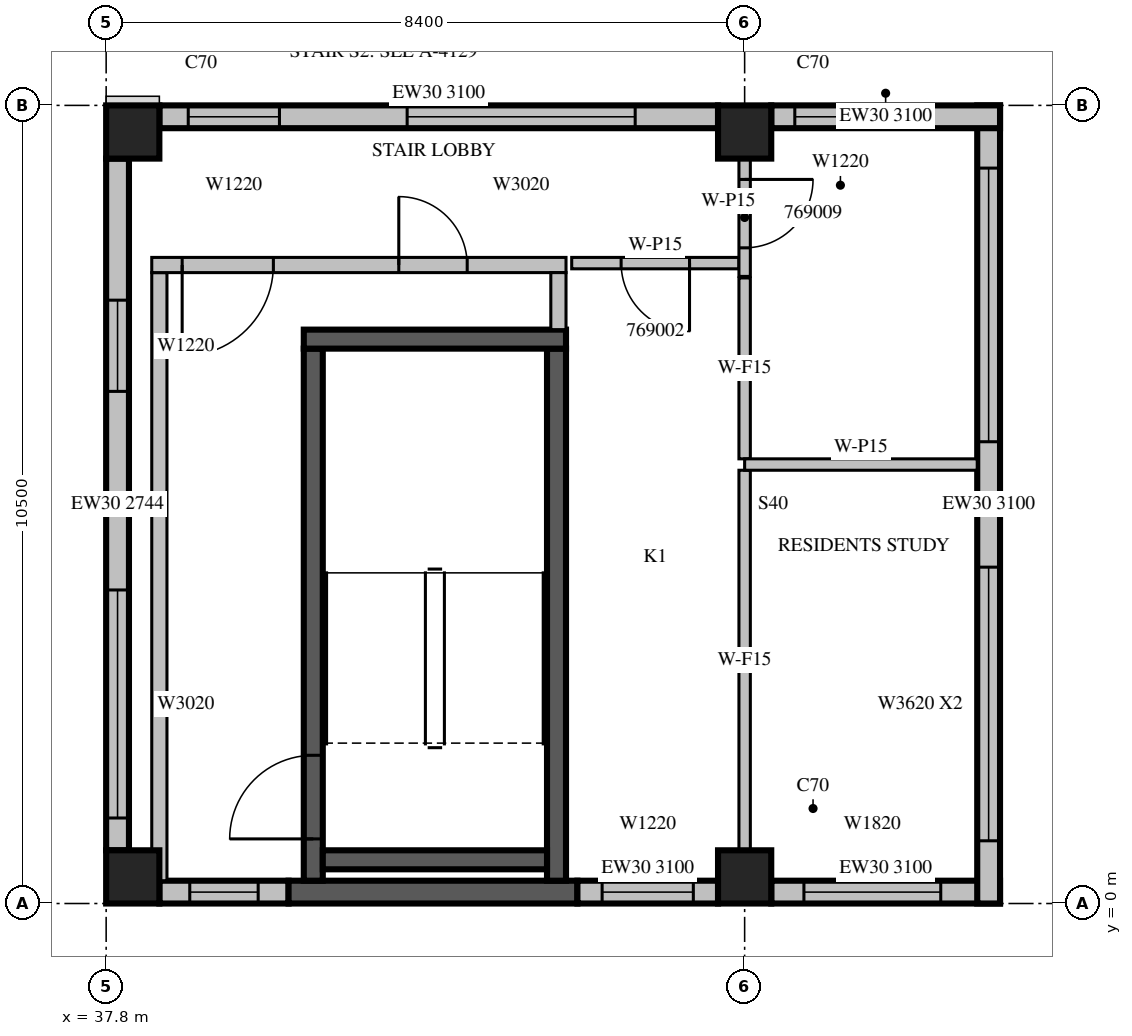
"""IFC4 building model, lengths in metres.
Left out: names, types, materials, properties, quantities, classifications, styles, units other than length and angle.
Written with IfcOpenShell. Run it as: python <this file> out.ifc"""

import sys

from ifc_helpers import new_model, si_unit, direction, frame, frame_2d, origin, origin_2d, place, context, subcontext, project, spatial, rectangle, extrude, source, transform, mapped, element, fill, save


model = new_model("IFC4")
c1 = context("Model", 3, precision=1e-05, world=origin(), true_north=direction((0.0, 1.0)))
c2 = subcontext(c1, "Body", "Model", "MODEL_VIEW")
j1 = project(units=[si_unit("LENGTHUNIT", "METRE"), si_unit("PLANEANGLEUNIT", "RADIAN")], contexts=[c1])
p1 = place(None, origin())
s1 = spatial("IfcSite", under=j1, at=p1, CompositionType="ELEMENT")
p2 = place(p1, origin())
s2 = spatial("IfcBuilding", under=s1, at=p2, CompositionType="ELEMENT")
p3 = place(p2, frame((0.0, 0.0, 302.0)))
s3 = spatial("IfcBuildingStorey", under=s2, at=p3, CompositionType="ELEMENT", Elevation=302.0)
m1 = source(origin(), c2, "Body", "SweptSolid", [
    extrude(rectangle(XDim=0.7, YDim=0.7, at=origin_2d()), origin(), (0.0, 0.0, 1.0), 3.5),
])
for number, where, z_axis, x_axis in (
    (1, (38.15, 0.35, 0.0), (0.0, 0.0, 1.0), (1.0, 0.0, 0.0)),
    (2, (46.2, 0.35, 0.0), (0.0, 0.0, 1.0), (1.0, 0.0, 0.0)),
    (3, (38.15, 10.15, 0.0), (0.0, 0.0, 1.0), (1.0, 0.0, 0.0)),
    (4, (46.2, 10.15, 0.0), (0.0, 0.0, 1.0), (1.0, 0.0, 0.0)),
):
    element("IfcColumn", number, at=place(p3, frame(where, z_axis=z_axis, x_axis=x_axis)), inside=s3, PredefinedType="COLUMN", context=c2, shape_type="MappedRepresentation", body=[
        mapped(m1, transform((0.0, 0.0, 0.0), scale=1.0)),
    ])
m2 = source(origin(), c2, "Body", "SweptSolid", [
    extrude(rectangle(XDim=1.7, YDim=0.3, at=frame_2d((0.85, 0.0))), origin(), (0.0, 0.0, 1.0), 3.1),
])
p4 = place(p3, frame((38.5, 0.15, 0.0), z_axis=(0.0, 0.0, 1.0), x_axis=(1.0, 0.0, 0.0)))
e5 = element("IfcWall", 5, at=p4, inside=s3, PredefinedType="STANDARD", context=c2, shape_type="MappedRepresentation", body=[
    mapped(m2, transform((0.0, 0.0, 0.0), scale=1.0)),
])
m3 = source(origin(), c2, "Body", "SweptSolid", [
    extrude(rectangle(XDim=0.9, YDim=2.0, at=frame_2d((0.45, 1.0))), frame((0.0, 0.16, 0.0), z_axis=(0.0, -1.0, 0.0), x_axis=(1.0, 0.0, 0.0)), (0.0, 0.0, 1.0), 0.32),
])
p5 = place(p4, frame((0.4, 0.0, 0.6)))
e6 = element("IfcOpeningElement", 6, at=p5, cuts=e5, PredefinedType="OPENING", context=c2, shape_type="MappedRepresentation", body=[
    mapped(m3, transform((0.0, 0.0, 0.0), scale=1.0)),
])
m4 = source(origin(), c2, "Body", "SweptSolid", [
    extrude(rectangle(XDim=3.8, YDim=0.3, at=frame_2d((1.9, 0.0))), origin(), (0.0, 0.0, 1.0), 3.1),
])
p6 = place(p3, frame((40.2, 0.15, 0.0), z_axis=(0.0, 0.0, 1.0), x_axis=(1.0, 0.0, 0.0)))
e7 = element("IfcWall", 7, at=p6, inside=s3, PredefinedType="SOLIDWALL", context=c2, shape_type="MappedRepresentation", body=[
    mapped(m4, transform((0.0, 0.0, 0.0), scale=1.0)),
])
m5 = source(origin(), c2, "Body", "SweptSolid", [
    extrude(rectangle(XDim=1.85, YDim=0.3, at=frame_2d((0.925, 0.0))), origin(), (0.0, 0.0, 1.0), 3.1),
])
p7 = place(p3, frame((44.0, 0.15, 0.0), z_axis=(0.0, 0.0, 1.0), x_axis=(1.0, 0.0, 0.0)))
e8 = element("IfcWall", 8, at=p7, inside=s3, PredefinedType="STANDARD", context=c2, shape_type="MappedRepresentation", body=[
    mapped(m5, transform((0.0, 0.0, 0.0), scale=1.0)),
])
m6 = source(origin(), c2, "Body", "SweptSolid", [
    extrude(rectangle(XDim=1.2, YDim=2.0, at=frame_2d((0.6, 1.0))), frame((0.0, 0.16, 0.0), z_axis=(0.0, -1.0, 0.0), x_axis=(1.0, 0.0, 0.0)), (0.0, 0.0, 1.0), 0.32),
])
p8 = place(p7, frame((0.325, 0.0, 0.6)))
e9 = element("IfcOpeningElement", 9, at=p8, cuts=e8, PredefinedType="OPENING", context=c2, shape_type="MappedRepresentation", body=[
    mapped(m6, transform((0.0, 0.0, 0.0), scale=1.0)),
])
m7 = source(origin(), c2, "Body", "SweptSolid", [
    extrude(rectangle(XDim=3.01, YDim=0.3, at=frame_2d((1.505, 0.0))), origin(), (0.0, 0.0, 1.0), 3.1),
])
p9 = place(p3, frame((46.55, 0.15, 0.0), z_axis=(0.0, 0.0, 1.0), x_axis=(1.0, 0.0, 0.0)))
e10 = element("IfcWall", 10, at=p9, inside=s3, PredefinedType="STANDARD", context=c2, shape_type="MappedRepresentation", body=[
    mapped(m7, transform((0.0, 0.0, 0.0), scale=1.0)),
])
m8 = source(origin(), c2, "Body", "SweptSolid", [
    extrude(rectangle(XDim=1.8, YDim=2.0, at=frame_2d((0.9, 1.0))), frame((0.0, 0.16, 0.0), z_axis=(0.0, -1.0, 0.0), x_axis=(1.0, 0.0, 0.0)), (0.0, 0.0, 1.0), 0.32),
])
p10 = place(p9, frame((0.43, 0.0, 0.6)))
e11 = element("IfcOpeningElement", 11, at=p10, cuts=e10, PredefinedType="OPENING", context=c2, shape_type="MappedRepresentation", body=[
    mapped(m8, transform((0.0, 0.0, 0.0), scale=1.0)),
])
m9 = source(origin(), c2, "Body", "SweptSolid", [
    extrude(rectangle(XDim=10.5, YDim=0.3, at=frame_2d((5.25, 0.0))), origin(), (0.0, 0.0, 1.0), 3.1),
])
p11 = place(p3, frame((49.41, 0.0, 0.0), z_axis=(0.0, 0.0, 1.0), x_axis=(0.0, 1.0, 0.0)))
e12 = element("IfcWall", 12, at=p11, inside=s3, PredefinedType="STANDARD", context=c2, shape_type="MappedRepresentation", body=[
    mapped(m9, transform((0.0, 0.0, 0.0), scale=1.0)),
])
m10 = source(origin(), c2, "Body", "SweptSolid", [
    extrude(rectangle(XDim=3.6, YDim=2.0, at=frame_2d((1.8, 1.0))), frame((0.0, 0.16, 0.0), z_axis=(0.0, -1.0, 0.0), x_axis=(1.0, 0.0, 0.0)), (0.0, 0.0, 1.0), 0.32),
])
p12 = place(p11, frame((0.825, 0.0, 0.6)))
e13 = element("IfcOpeningElement", 13, at=p12, cuts=e12, PredefinedType="OPENING", context=c2, shape_type="MappedRepresentation", body=[
    mapped(m10, transform((0.0, 0.0, 0.0), scale=1.0)),
])
p13 = place(p11, frame((6.075, 0.0, 0.6)))
e14 = element("IfcOpeningElement", 14, at=p13, cuts=e12, PredefinedType="OPENING", context=c2, shape_type="MappedRepresentation", body=[
    mapped(m10, transform((0.0, 0.0, 0.0), scale=1.0)),
])
p14 = place(p3, frame((49.56, 10.35, 0.0), z_axis=(0.0, 0.0, 1.0), x_axis=(-1.0, 0.0, 0.0)))
e15 = element("IfcWall", 15, at=p14, inside=s3, PredefinedType="STANDARD", context=c2, shape_type="MappedRepresentation", body=[
    mapped(m7, transform((0.0, 0.0, 0.0), scale=1.0)),
])
p15 = place(p14, frame((1.5, 0.0, 0.6)))
e16 = element("IfcOpeningElement", 16, at=p15, cuts=e15, PredefinedType="OPENING", context=c2, shape_type="MappedRepresentation", body=[
    mapped(m6, transform((0.0, 0.0, 0.0), scale=1.0)),
])
m11 = source(origin(), c2, "Body", "SweptSolid", [
    extrude(rectangle(XDim=7.35, YDim=0.3, at=frame_2d((3.675, 0.0))), origin(), (0.0, 0.0, 1.0), 3.1),
])
p16 = place(p3, frame((45.85, 10.35, 0.0), z_axis=(0.0, 0.0, 1.0), x_axis=(-1.0, 0.0, 0.0)))
e17 = element("IfcWall", 17, at=p16, inside=s3, PredefinedType="STANDARD", context=c2, shape_type="MappedRepresentation", body=[
    mapped(m11, transform((0.0, 0.0, 0.0), scale=1.0)),
])
m12 = source(origin(), c2, "Body", "SweptSolid", [
    extrude(rectangle(XDim=3.0, YDim=2.0, at=frame_2d((1.5, 1.0))), frame((0.0, 0.16, 0.0), z_axis=(0.0, -1.0, 0.0), x_axis=(1.0, 0.0, 0.0)), (0.0, 0.0, 1.0), 0.32),
])
p17 = place(p16, frame((1.09, 0.0, 0.6)))
e18 = element("IfcOpeningElement", 18, at=p17, cuts=e17, PredefinedType="OPENING", context=c2, shape_type="MappedRepresentation", body=[
    mapped(m12, transform((0.0, 0.0, 0.0), scale=1.0)),
])
p18 = place(p16, frame((5.77, 0.0, 0.6)))
e19 = element("IfcOpeningElement", 19, at=p18, cuts=e17, PredefinedType="OPENING", context=c2, shape_type="MappedRepresentation", body=[
    mapped(m6, transform((0.0, 0.0, 0.0), scale=1.0)),
])
m13 = source(origin(), c2, "Body", "SweptSolid", [
    extrude(rectangle(XDim=9.1, YDim=0.3, at=frame_2d((4.55, 0.0))), origin(), (0.0, 0.0, 1.0), 2.744),
])
p19 = place(p3, frame((37.95, 9.8, 0.0), z_axis=(0.0, 0.0, 1.0), x_axis=(0.0, -1.0, 0.0)))
e20 = element("IfcWall", 20, at=p19, inside=s3, PredefinedType="STANDARD", context=c2, shape_type="MappedRepresentation", body=[
    mapped(m13, transform((0.0, 0.0, 0.0), scale=1.0)),
])
p20 = place(p19, frame((1.863, 0.0, 0.6)))
e21 = element("IfcOpeningElement", 21, at=p20, cuts=e20, PredefinedType="OPENING", context=c2, shape_type="MappedRepresentation", body=[
    mapped(m6, transform((0.0, 0.0, 0.0), scale=1.0)),
])
p21 = place(p19, frame((5.675, 0.0, 0.6)))
e22 = element("IfcOpeningElement", 22, at=p21, cuts=e20, PredefinedType="OPENING", context=c2, shape_type="MappedRepresentation", body=[
    mapped(m12, transform((0.0, 0.0, 0.0), scale=1.0)),
])
m14 = source(origin(), c2, "Body", "SweptSolid", [
    extrude(rectangle(XDim=7.0, YDim=0.25, at=frame_2d((3.5, 0.0))), origin(), (0.0, 0.0, 1.0), 3.1),
])
p22 = place(p3, frame((40.525, 0.3, 0.0), z_axis=(0.0, 0.0, 1.0), x_axis=(0.0, 1.0, 0.0)))
e23 = element("IfcWall", 23, at=p22, inside=s3, PredefinedType="SOLIDWALL", context=c2, shape_type="MappedRepresentation", body=[
    mapped(m14, transform((0.0, 0.0, 0.0), scale=1.0)),
])
m15 = source(origin(), c2, "Body", "SweptSolid", [
    extrude(rectangle(XDim=1.1, YDim=2.1, at=frame_2d((0.55, 1.05))), frame((0.0, 0.135, 0.0), z_axis=(0.0, -1.0, 0.0), x_axis=(1.0, 0.0, 0.0)), (0.0, 0.0, 1.0), 0.27),
])
p23 = place(p22, frame((0.55, 0.0, 0.0)))
e24 = element("IfcOpeningElement", 24, at=p23, cuts=e23, PredefinedType="OPENING", context=c2, shape_type="MappedRepresentation", body=[
    mapped(m15, transform((0.0, 0.0, 0.0), scale=1.0)),
])
p24 = place(p3, frame((43.725, 0.3, 0.0), z_axis=(0.0, 0.0, 1.0), x_axis=(0.0, 1.0, 0.0)))
e25 = element("IfcWall", 25, at=p24, inside=s3, PredefinedType="SOLIDWALL", context=c2, shape_type="MappedRepresentation", body=[
    mapped(m14, transform((0.0, 0.0, 0.0), scale=1.0)),
])
m16 = source(origin(), c2, "Body", "SweptSolid", [
    extrude(rectangle(XDim=3.45, YDim=0.25, at=frame_2d((1.725, 0.0))), origin(), (0.0, 0.0, 1.0), 3.1),
])
p25 = place(p3, frame((40.4, 7.425, 0.0), z_axis=(0.0, 0.0, 1.0), x_axis=(1.0, 0.0, 0.0)))
e26 = element("IfcWall", 26, at=p25, inside=s3, PredefinedType="SOLIDWALL", context=c2, shape_type="MappedRepresentation", body=[
    mapped(m16, transform((0.0, 0.0, 0.0), scale=1.0)),
])
m17 = source(origin(), c2, "Body", "SweptSolid", [
    extrude(rectangle(XDim=2.95, YDim=0.25, at=frame_2d((1.475, 0.0))), origin(), (0.0, 0.0, 1.0), 3.1),
])
p26 = place(p3, frame((40.65, 0.575, 0.0), z_axis=(0.0, 0.0, 1.0), x_axis=(1.0, 0.0, 0.0)))
e27 = element("IfcWall", 27, at=p26, inside=s3, PredefinedType="SOLIDWALL", context=c2, shape_type="MappedRepresentation", body=[
    mapped(m17, transform((0.0, 0.0, 0.0), scale=1.0)),
])
m18 = source(origin(), c2, "Body", "SweptSolid", [
    extrude(rectangle(XDim=8.0, YDim=0.2, at=frame_2d((4.0, 0.0))), origin(), (0.0, 0.0, 1.0), 3.1),
])
p27 = place(p3, frame((38.5, 0.3, 0.0), z_axis=(0.0, 0.0, 1.0), x_axis=(0.0, 1.0, 0.0)))
e28 = element("IfcWall", 28, at=p27, inside=s3, PredefinedType="PARTITIONING", context=c2, shape_type="MappedRepresentation", body=[
    mapped(m18, transform((0.0, 0.0, 0.0), scale=1.0)),
])
m19 = source(origin(), c2, "Body", "SweptSolid", [
    extrude(rectangle(XDim=5.45, YDim=0.2, at=frame_2d((2.725, 0.0))), origin(), (0.0, 0.0, 1.0), 3.1),
])
p28 = place(p3, frame((38.4, 8.4, 0.0), z_axis=(0.0, 0.0, 1.0), x_axis=(1.0, 0.0, 0.0)))
e29 = element("IfcWall", 29, at=p28, inside=s3, PredefinedType="PARTITIONING", context=c2, shape_type="MappedRepresentation", body=[
    mapped(m19, transform((0.0, 0.0, 0.0), scale=1.0)),
])
m20 = source(origin(), c2, "Body", "SweptSolid", [
    extrude(rectangle(XDim=1.2, YDim=2.1, at=frame_2d((0.6, 1.05))), frame((0.0, 0.11, 0.0), z_axis=(0.0, -1.0, 0.0), x_axis=(1.0, 0.0, 0.0)), (0.0, 0.0, 1.0), 0.22),
])
p29 = place(p28, frame((0.4, 0.0, 0.0)))
e30 = element("IfcOpeningElement", 30, at=p29, cuts=e29, PredefinedType="OPENING", context=c2, shape_type="MappedRepresentation", body=[
    mapped(m20, transform((0.0, 0.0, 0.0), scale=1.0)),
])
m21 = source(origin(), c2, "Body", "SweptSolid", [
    extrude(rectangle(XDim=0.9, YDim=2.1, at=frame_2d((0.45, 1.05))), frame((0.0, 0.11, 0.0), z_axis=(0.0, -1.0, 0.0), x_axis=(1.0, 0.0, 0.0)), (0.0, 0.0, 1.0), 0.22),
])
p30 = place(p28, frame((3.25, 0.0, 0.0)))
e31 = element("IfcOpeningElement", 31, at=p30, cuts=e29, PredefinedType="OPENING", context=c2, shape_type="MappedRepresentation", body=[
    mapped(m21, transform((0.0, 0.0, 0.0), scale=1.0)),
])
m22 = source(origin(), c2, "Body", "SweptSolid", [
    extrude(rectangle(XDim=0.75, YDim=0.2, at=frame_2d((0.375, 0.0))), origin(), (0.0, 0.0, 1.0), 3.1),
])
p31 = place(p3, frame((43.75, 7.55, 0.0), z_axis=(0.0, 0.0, 1.0), x_axis=(0.0, 1.0, 0.0)))
e32 = element("IfcWall", 32, at=p31, inside=s3, PredefinedType="PARTITIONING", context=c2, shape_type="MappedRepresentation", body=[
    mapped(m22, transform((0.0, 0.0, 0.0), scale=1.0)),
])
m23 = source(origin(), c2, "Body", "SweptSolid", [
    extrude(rectangle(XDim=2.2, YDim=0.15, at=frame_2d((1.1, 0.0))), origin(), (0.0, 0.0, 1.0), 3.1),
])
p32 = place(p3, frame((46.125, 8.425, 0.0), z_axis=(0.0, 0.0, 1.0), x_axis=(-1.0, 0.0, 0.0)))
e33 = element("IfcWall", 33, at=p32, inside=s3, PredefinedType="PARTITIONING", context=c2, shape_type="MappedRepresentation", body=[
    mapped(m23, transform((0.0, 0.0, 0.0), scale=1.0)),
])
m24 = source(origin(), c2, "Body", "SweptSolid", [
    extrude(rectangle(XDim=0.9, YDim=2.1, at=frame_2d((0.45, 1.05))), frame((0.0, 0.085, 0.0), z_axis=(0.0, -1.0, 0.0), x_axis=(1.0, 0.0, 0.0)), (0.0, 0.0, 1.0), 0.17),
])
p33 = place(p32, frame((0.65, 0.0, 0.0)))
e34 = element("IfcOpeningElement", 34, at=p33, cuts=e33, PredefinedType="OPENING", context=c2, shape_type="MappedRepresentation", body=[
    mapped(m24, transform((0.0, 0.0, 0.0), scale=1.0)),
])
m25 = source(origin(), c2, "Body", "SweptSolid", [
    extrude(rectangle(XDim=1.551, YDim=0.15, at=frame_2d((0.775, 0.0))), origin(), (0.0, 0.0, 1.0), 3.1),
])
p34 = place(p3, frame((46.2, 9.801, 0.0), z_axis=(0.0, 0.0, 1.0), x_axis=(0.0, -1.0, 0.0)))
e35 = element("IfcWall", 35, at=p34, inside=s3, PredefinedType="PARTITIONING", context=c2, shape_type="MappedRepresentation", body=[
    mapped(m25, transform((0.0, 0.0, 0.0), scale=1.0)),
])
p35 = place(p34, frame((0.275, 0.0, 0.0)))
e36 = element("IfcOpeningElement", 36, at=p35, cuts=e35, PredefinedType="OPENING", context=c2, shape_type="MappedRepresentation", body=[
    mapped(m24, transform((0.0, 0.0, 0.0), scale=1.0)),
])
m26 = source(origin(), c2, "Body", "SweptSolid", [
    extrude(rectangle(XDim=5.001, YDim=0.15, at=frame_2d((2.501, 0.0))), origin(), (0.0, 0.0, 1.0), 3.1),
])
p36 = place(p3, frame((46.2, 0.699, 0.0), z_axis=(0.0, 0.0, 1.0), x_axis=(0.0, 1.0, 0.0)))
e37 = element("IfcWall", 37, at=p36, inside=s3, PredefinedType="PARTITIONING", context=c2, shape_type="MappedRepresentation", body=[
    mapped(m26, transform((0.0, 0.0, 0.0), scale=1.0)),
])
m27 = source(origin(), c2, "Body", "SweptSolid", [
    extrude(rectangle(XDim=2.38, YDim=0.15, at=frame_2d((1.19, 0.0))), origin(), (0.0, 0.0, 1.0), 3.1),
])
p37 = place(p3, frame((46.2, 5.85, 0.0), z_axis=(0.0, 0.0, 1.0), x_axis=(0.0, 1.0, 0.0)))
e38 = element("IfcWall", 38, at=p37, inside=s3, PredefinedType="PARTITIONING", context=c2, shape_type="MappedRepresentation", body=[
    mapped(m27, transform((0.0, 0.0, 0.0), scale=1.0)),
])
m28 = source(origin(), c2, "Body", "SweptSolid", [
    extrude(rectangle(XDim=3.06, YDim=0.15, at=frame_2d((1.53, 0.0))), origin(), (0.0, 0.0, 1.0), 3.1),
])
p38 = place(p3, frame((49.26, 5.775, 0.0), z_axis=(0.0, 0.0, 1.0), x_axis=(-1.0, 0.0, 0.0)))
e39 = element("IfcWall", 39, at=p38, inside=s3, PredefinedType="PARTITIONING", context=c2, shape_type="MappedRepresentation", body=[
    mapped(m28, transform((0.0, 0.0, 0.0), scale=1.0)),
])
m29 = source(origin(), c2, "Body", "SweptSolid", [
    extrude(rectangle(XDim=0.9, YDim=2.0, at=frame_2d((0.45, 1.0))), frame((0.0, 0.03, 0.0), z_axis=(0.0, -1.0, 0.0), x_axis=(1.0, 0.0, 0.0)), (0.0, 0.0, 1.0), 0.06),
])
p39 = place(p5, origin())
e40 = element("IfcWindow", 40, at=p39, inside=s3, PartitioningType="SINGLE_PANEL", PredefinedType="WINDOW", context=c2, shape_type="MappedRepresentation", body=[
    mapped(m29, transform((0.0, 0.0, 0.0), scale=1.0)),
])
fill(e6, e40)
m30 = source(origin(), c2, "Body", "SweptSolid", [
    extrude(rectangle(XDim=1.2, YDim=2.0, at=frame_2d((0.6, 1.0))), frame((0.0, 0.03, 0.0), z_axis=(0.0, -1.0, 0.0), x_axis=(1.0, 0.0, 0.0)), (0.0, 0.0, 1.0), 0.06),
])
p40 = place(p8, origin())
e41 = element("IfcWindow", 41, at=p40, inside=s3, PartitioningType="SINGLE_PANEL", PredefinedType="WINDOW", context=c2, shape_type="MappedRepresentation", body=[
    mapped(m30, transform((0.0, 0.0, 0.0), scale=1.0)),
])
fill(e9, e41)
m31 = source(origin(), c2, "Body", "SweptSolid", [
    extrude(rectangle(XDim=1.8, YDim=2.0, at=frame_2d((0.9, 1.0))), frame((0.0, 0.03, 0.0), z_axis=(0.0, -1.0, 0.0), x_axis=(1.0, 0.0, 0.0)), (0.0, 0.0, 1.0), 0.06),
])
p41 = place(p10, origin())
e42 = element("IfcWindow", 42, at=p41, inside=s3, PartitioningType="SINGLE_PANEL", PredefinedType="WINDOW", context=c2, shape_type="MappedRepresentation", body=[
    mapped(m31, transform((0.0, 0.0, 0.0), scale=1.0)),
])
fill(e11, e42)
m32 = source(origin(), c2, "Body", "SweptSolid", [
    extrude(rectangle(XDim=3.6, YDim=2.0, at=frame_2d((1.8, 1.0))), frame((0.0, 0.03, 0.0), z_axis=(0.0, -1.0, 0.0), x_axis=(1.0, 0.0, 0.0)), (0.0, 0.0, 1.0), 0.06),
])
p42 = place(p12, origin())
e43 = element("IfcWindow", 43, at=p42, inside=s3, PartitioningType="SINGLE_PANEL", PredefinedType="WINDOW", context=c2, shape_type="MappedRepresentation", body=[
    mapped(m32, transform((0.0, 0.0, 0.0), scale=1.0)),
])
fill(e13, e43)
p43 = place(p13, origin())
e44 = element("IfcWindow", 44, at=p43, inside=s3, PartitioningType="SINGLE_PANEL", PredefinedType="WINDOW", context=c2, shape_type="MappedRepresentation", body=[
    mapped(m32, transform((0.0, 0.0, 0.0), scale=1.0)),
])
fill(e14, e44)
p44 = place(p15, origin())
e45 = element("IfcWindow", 45, at=p44, inside=s3, PartitioningType="SINGLE_PANEL", PredefinedType="WINDOW", context=c2, shape_type="MappedRepresentation", body=[
    mapped(m30, transform((0.0, 0.0, 0.0), scale=1.0)),
])
fill(e16, e45)
m33 = source(origin(), c2, "Body", "SweptSolid", [
    extrude(rectangle(XDim=3.0, YDim=2.0, at=frame_2d((1.5, 1.0))), frame((0.0, 0.03, 0.0), z_axis=(0.0, -1.0, 0.0), x_axis=(1.0, 0.0, 0.0)), (0.0, 0.0, 1.0), 0.06),
])
p45 = place(p17, origin())
e46 = element("IfcWindow", 46, at=p45, inside=s3, PartitioningType="SINGLE_PANEL", PredefinedType="WINDOW", context=c2, shape_type="MappedRepresentation", body=[
    mapped(m33, transform((0.0, 0.0, 0.0), scale=1.0)),
])
fill(e18, e46)
p46 = place(p18, origin())
e47 = element("IfcWindow", 47, at=p46, inside=s3, PartitioningType="SINGLE_PANEL", PredefinedType="WINDOW", context=c2, shape_type="MappedRepresentation", body=[
    mapped(m30, transform((0.0, 0.0, 0.0), scale=1.0)),
])
fill(e19, e47)
p47 = place(p20, origin())
e48 = element("IfcWindow", 48, at=p47, inside=s3, PartitioningType="SINGLE_PANEL", PredefinedType="WINDOW", context=c2, shape_type="MappedRepresentation", body=[
    mapped(m30, transform((0.0, 0.0, 0.0), scale=1.0)),
])
fill(e21, e48)
p48 = place(p21, origin())
e49 = element("IfcWindow", 49, at=p48, inside=s3, PartitioningType="SINGLE_PANEL", PredefinedType="WINDOW", context=c2, shape_type="MappedRepresentation", body=[
    mapped(m33, transform((0.0, 0.0, 0.0), scale=1.0)),
])
fill(e22, e49)
m34 = source(origin(), c2, "Body", "SweptSolid", [
    extrude(rectangle(XDim=1.1, YDim=2.1, at=frame_2d((0.55, 1.05))), frame((0.0, 0.025, 0.0), z_axis=(0.0, -1.0, 0.0), x_axis=(1.0, 0.0, 0.0)), (0.0, 0.0, 1.0), 0.05),
])
p49 = place(p23, origin())
e50 = element("IfcDoor", 50, at=p49, inside=s3, OperationType="SINGLE_SWING_LEFT", PredefinedType="DOOR", context=c2, shape_type="MappedRepresentation", body=[
    mapped(m34, transform((0.0, 0.0, 0.0), scale=1.0)),
])
fill(e24, e50)
m35 = source(origin(), c2, "Body", "SweptSolid", [
    extrude(rectangle(XDim=1.2, YDim=2.1, at=frame_2d((0.6, 1.05))), frame((0.0, 0.025, 0.0), z_axis=(0.0, -1.0, 0.0), x_axis=(1.0, 0.0, 0.0)), (0.0, 0.0, 1.0), 0.05),
])
p50 = place(p29, origin())
e51 = element("IfcDoor", 51, at=p50, inside=s3, OperationType="SINGLE_SWING_RIGHT", PredefinedType="DOOR", context=c2, shape_type="MappedRepresentation", body=[
    mapped(m35, transform((0.0, 0.0, 0.0), scale=1.0)),
])
fill(e30, e51)
m36 = source(origin(), c2, "Body", "SweptSolid", [
    extrude(rectangle(XDim=0.9, YDim=2.1, at=frame_2d((0.45, 1.05))), frame((0.0, 0.025, 0.0), z_axis=(0.0, -1.0, 0.0), x_axis=(1.0, 0.0, 0.0)), (0.0, 0.0, 1.0), 0.05),
])
p51 = place(p30, origin())
e52 = element("IfcDoor", 52, at=p51, inside=s3, OperationType="SINGLE_SWING_LEFT", PredefinedType="DOOR", context=c2, shape_type="MappedRepresentation", body=[
    mapped(m36, transform((0.0, 0.0, 0.0), scale=1.0)),
])
fill(e31, e52)
p52 = place(p33, origin())
e53 = element("IfcDoor", 53, at=p52, inside=s3, OperationType="SINGLE_SWING_LEFT", PredefinedType="DOOR", context=c2, shape_type="MappedRepresentation", body=[
    mapped(m36, transform((0.0, 0.0, 0.0), scale=1.0)),
])
fill(e34, e53)
p53 = place(p35, origin())
e54 = element("IfcDoor", 54, at=p53, inside=s3, OperationType="SINGLE_SWING_LEFT", PredefinedType="DOOR", context=c2, shape_type="MappedRepresentation", body=[
    mapped(m36, transform((0.0, 0.0, 0.0), scale=1.0)),
])
fill(e36, e54)
save(model, sys.argv[1])
